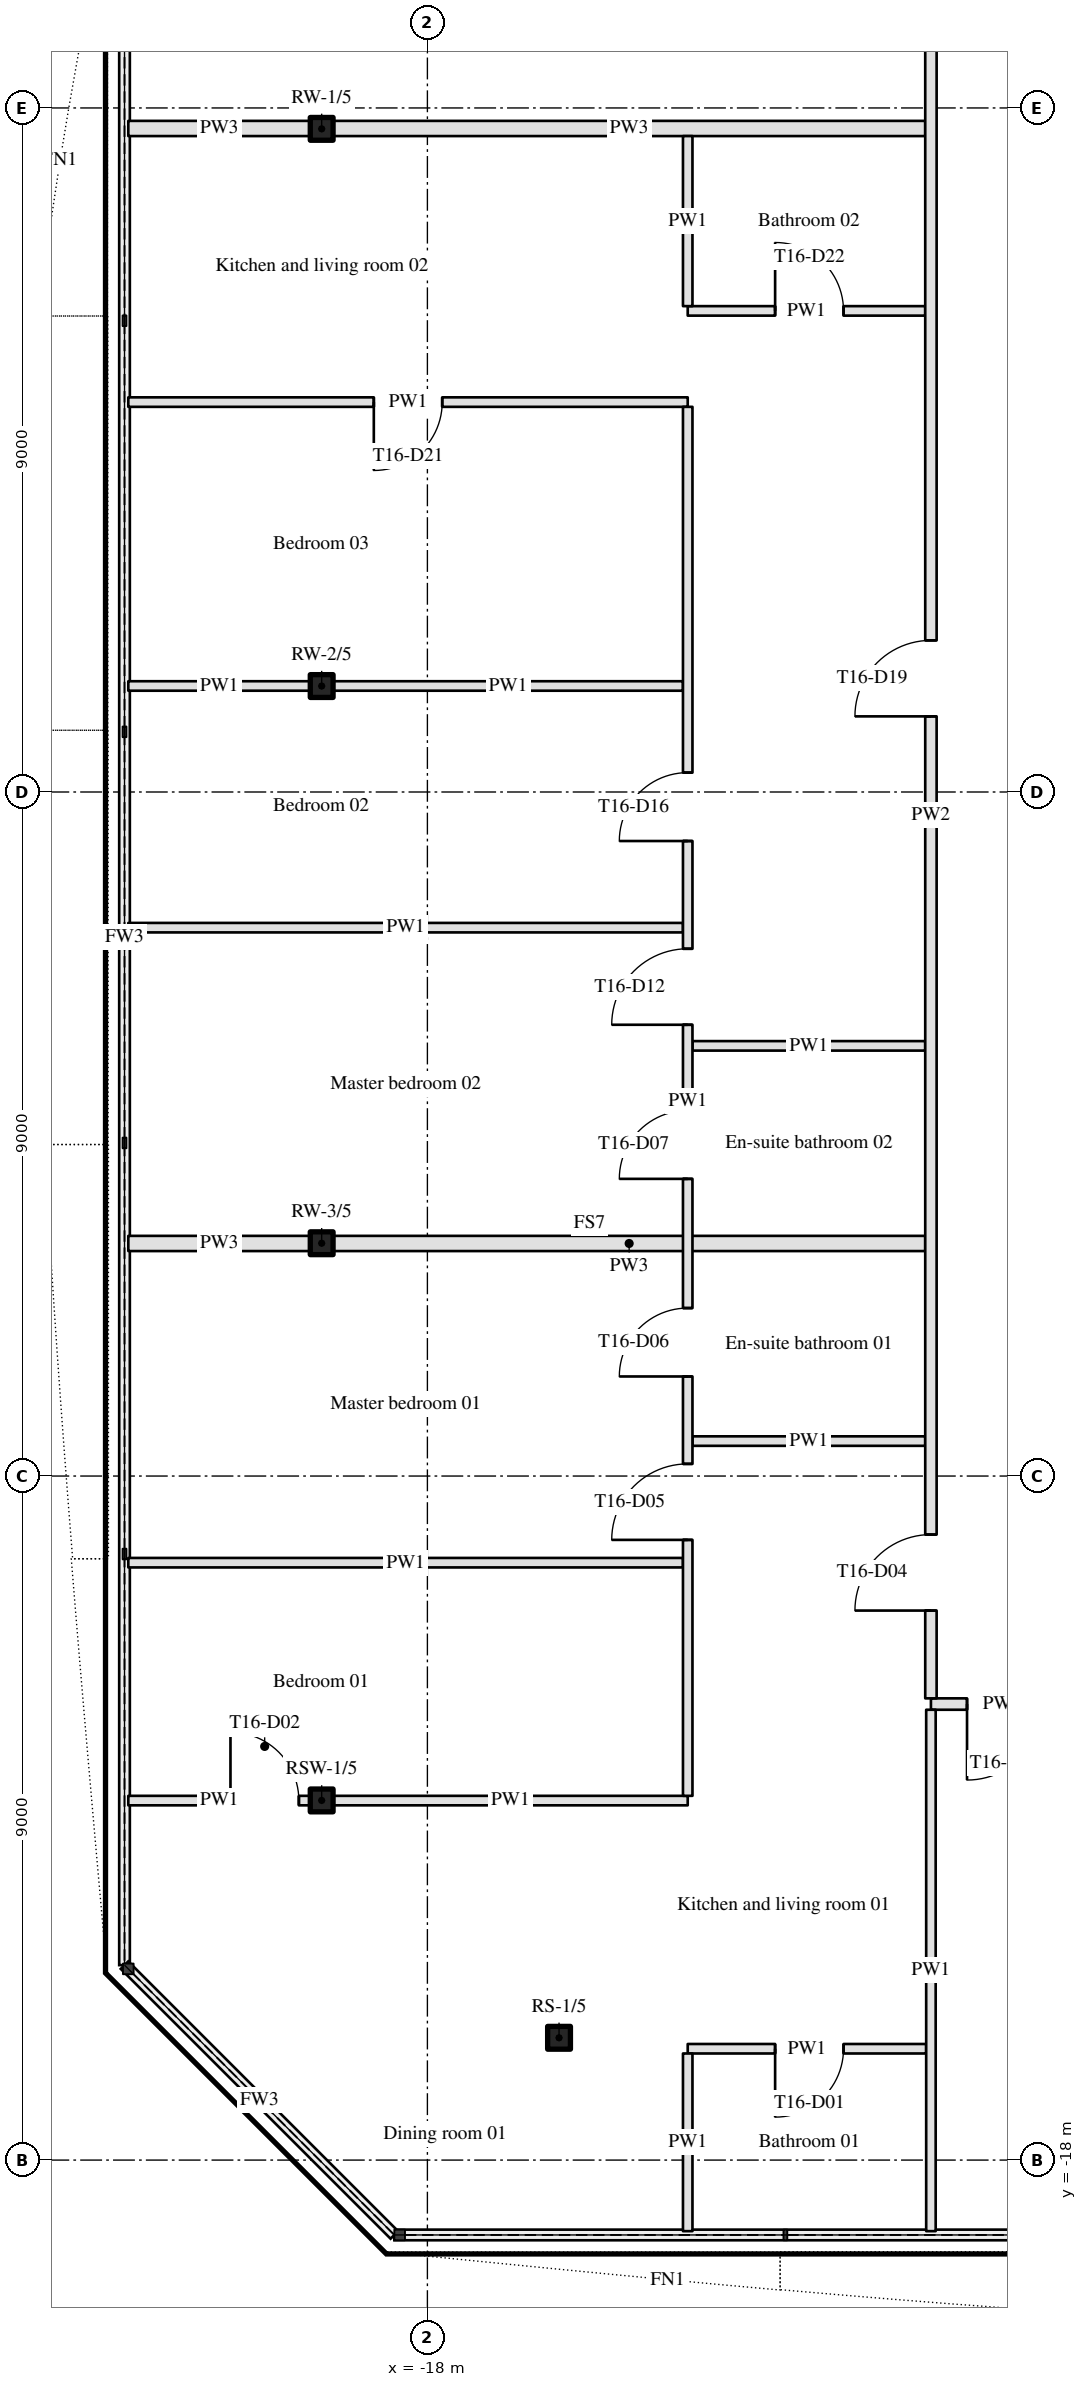
"""IFC4 building model, lengths in metres.
Left out: names, types, materials, properties, quantities, classifications, styles, units other than length and angle.
Written with IfcOpenShell. Run it as: python <this file> out.ifc"""

import sys

from ifc_helpers import new_model, si_unit, direction, frame, frame_2d, origin, origin_2d, place, context, subcontext, project, spatial, rectangle, hollow_rectangle, extrude, element, fill, save


model = new_model("IFC4")
c1 = context("Model", 3, precision=1e-05, world=origin(), true_north=direction((0.0, 1.0)))
c2 = subcontext(c1, "Body", "Model", "MODEL_VIEW")
j1 = project(units=[si_unit("LENGTHUNIT", "METRE"), si_unit("PLANEANGLEUNIT", "RADIAN")], contexts=[c1])
p1 = place(None, origin())
s1 = spatial("IfcSite", under=j1, at=p1, CompositionType="ELEMENT")
p2 = place(p1, origin())
s2 = spatial("IfcBuilding", under=s1, at=p2, CompositionType="ELEMENT")
p3 = place(p2, frame((0.0, 0.0, 217.2)))
s3 = spatial("IfcBuildingStorey", under=s2, at=p3, CompositionType="ELEMENT", Elevation=217.2)
for number, where, z_axis, x_axis in (
    (1, (-16.268, -16.391, 0.0), (0.0, 0.0, 1.0), (1.0, 0.0, 0.0)),
    (2, (-19.391, 8.725, 0.0), (0.0, 0.0, 1.0), (1.0, 0.0, 0.0)),
    (3, (-19.391, 1.394, 0.0), (0.0, 0.0, 1.0), (1.0, 0.0, 0.0)),
    (4, (-19.391, -5.937, 0.0), (0.0, 0.0, 1.0), (1.0, 0.0, 0.0)),
    (5, (-19.391, -13.268, 0.0), (0.0, 0.0, 1.0), (1.0, 0.0, 0.0)),
):
    element("IfcColumn", number, at=place(p3, frame(where, z_axis=z_axis, x_axis=x_axis)), inside=s3, PredefinedType="COLUMN", context=c2, shape_type="SweptSolid", body=[
        extrude(hollow_rectangle(XDim=0.3, YDim=0.3, WallThickness=0.02, InnerFilletRadius=0.03, OuterFilletRadius=0.05, at=origin_2d()), origin(), (0.0, 0.0, 1.0), 3.15),
    ])
p4 = place(p3, frame((-11.438, -16.535, 0.0), z_axis=(0.0, 0.0, 1.0), x_axis=(-1.0, 0.0, 0.0)))
e6 = element("IfcWall", 6, at=p4, inside=s3, PredefinedType="PARTITIONING", context=c2, shape_type="SweptSolid", body=[
    extrude(rectangle(XDim=3.137, YDim=0.125, at=frame_2d((1.569, 0.0))), origin(), (0.0, 0.0, 1.0), 2.21),
])
p5 = place(p4, frame((1.087, 0.0, 0.0)))
e7 = element("IfcOpeningElement", 7, at=p5, cuts=e6, PredefinedType="OPENING", context=c2, shape_type="SweptSolid", body=[
    extrude(rectangle(XDim=0.9, YDim=2.1, at=frame_2d((0.45, 1.05))), frame((0.0, 0.073, 0.0), z_axis=(0.0, -1.0, 0.0), x_axis=(1.0, 0.0, 0.0)), (0.0, 0.0, 1.0), 0.145),
])
p6 = place(p3, frame((-21.935, -13.27, 0.0), z_axis=(0.0, 0.0, 1.0), x_axis=(1.0, 0.0, 0.0)))
e8 = element("IfcWall", 8, at=p6, inside=s3, PredefinedType="PARTITIONING", context=c2, shape_type="SweptSolid", body=[
    extrude(rectangle(XDim=2.394, YDim=0.125, at=frame_2d((1.197, 0.0))), origin(), (0.0, 0.0, 1.0), 2.21),
])
p7 = place(p6, frame((1.344, 0.0, 0.0)))
e9 = element("IfcOpeningElement", 9, at=p7, cuts=e8, PredefinedType="OPENING", context=c2, shape_type="SweptSolid", body=[
    extrude(rectangle(XDim=0.9, YDim=2.1, at=frame_2d((0.45, 1.05))), frame((0.0, 0.073, 0.0), z_axis=(0.0, -1.0, 0.0), x_axis=(1.0, 0.0, 0.0)), (0.0, 0.0, 1.0), 0.145),
])
p8 = place(p3, frame((-19.241, -13.27, 0.0), z_axis=(0.0, 0.0, 1.0), x_axis=(1.0, 0.0, 0.0)))
e10 = element("IfcWall", 10, at=p8, inside=s3, PredefinedType="PARTITIONING", context=c2, shape_type="SweptSolid", body=[
    extrude(rectangle(XDim=4.666, YDim=0.125, at=frame_2d((2.333, 0.0))), origin(), (0.0, 0.0, 1.0), 2.21),
])
p9 = place(p3, frame((-9.5, -12.0, 0.0), z_axis=(0.0, 0.0, 1.0), x_axis=(-1.0, 0.0, 0.0)))
e11 = element("IfcWall", 11, at=p9, inside=s3, PredefinedType="PARTITIONING", context=c2, shape_type="SweptSolid", body=[
    extrude(rectangle(XDim=1.875, YDim=0.15, at=frame_2d((0.938, 0.0))), origin(), (0.0, 0.0, 1.0), 2.21),
])
p10 = place(p9, frame((0.4, 0.0, 0.0)))
e12 = element("IfcOpeningElement", 12, at=p10, cuts=e11, PredefinedType="OPENING", context=c2, shape_type="SweptSolid", body=[
    extrude(rectangle(XDim=1.0, YDim=2.1, at=frame_2d((0.5, 1.05))), frame((0.0, 0.085, 0.0), z_axis=(0.0, -1.0, 0.0), x_axis=(1.0, 0.0, 0.0)), (0.0, 0.0, 1.0), 0.17),
])
p11 = place(p3, frame((-21.935, -10.14, 0.0), z_axis=(0.0, 0.0, 1.0), x_axis=(1.0, 0.0, 0.0)))
e13 = element("IfcWall", 13, at=p11, inside=s3, PredefinedType="PARTITIONING", context=c2, shape_type="SweptSolid", body=[
    extrude(rectangle(XDim=7.298, YDim=0.125, at=frame_2d((3.649, 0.0))), origin(), (0.0, 0.0, 1.0), 2.21),
])
p12 = place(p3, frame((-14.512, -8.54, 0.0), z_axis=(0.0, 0.0, 1.0), x_axis=(1.0, 0.0, 0.0)))
e14 = element("IfcWall", 14, at=p12, inside=s3, PredefinedType="PARTITIONING", context=c2, shape_type="SweptSolid", body=[
    extrude(rectangle(XDim=3.062, YDim=0.125, at=frame_2d((1.531, 0.0))), origin(), (0.0, 0.0, 1.0), 2.21),
])
p13 = place(p3, frame((-21.935, -5.94, 0.0), z_axis=(0.0, 0.0, 1.0), x_axis=(1.0, 0.0, 0.0)))
e15 = element("IfcWall", 15, at=p13, inside=s3, PredefinedType="PARTITIONING", context=c2, shape_type="SweptSolid", body=[
    extrude(rectangle(XDim=2.394, YDim=0.2, at=frame_2d((1.197, 0.0))), origin(), (0.0, 0.0, 1.0), 2.21),
])
p14 = place(p3, frame((-19.241, -5.94, 0.0), z_axis=(0.0, 0.0, 1.0), x_axis=(1.0, 0.0, 0.0)))
e16 = element("IfcWall", 16, at=p14, inside=s3, PredefinedType="PARTITIONING", context=c2, shape_type="SweptSolid", body=[
    extrude(rectangle(XDim=7.791, YDim=0.2, at=frame_2d((3.896, 0.0))), origin(), (0.0, 0.0, 1.0), 2.21),
])
p15 = place(p3, frame((-14.512, -3.34, 0.0), z_axis=(0.0, 0.0, 1.0), x_axis=(1.0, 0.0, 0.0)))
e17 = element("IfcWall", 17, at=p15, inside=s3, PredefinedType="PARTITIONING", context=c2, shape_type="SweptSolid", body=[
    extrude(rectangle(XDim=3.062, YDim=0.125, at=frame_2d((1.531, 0.0))), origin(), (0.0, 0.0, 1.0), 2.21),
])
p16 = place(p3, frame((-21.935, -1.785, 0.0), z_axis=(0.0, 0.0, 1.0), x_axis=(1.0, 0.0, 0.0)))
e18 = element("IfcWall", 18, at=p16, inside=s3, PredefinedType="PARTITIONING", context=c2, shape_type="SweptSolid", body=[
    extrude(rectangle(XDim=7.298, YDim=0.125, at=frame_2d((3.649, 0.0))), origin(), (0.0, 0.0, 1.0), 2.21),
])
p17 = place(p3, frame((-21.935, 1.395, 0.0), z_axis=(0.0, 0.0, 1.0), x_axis=(1.0, 0.0, 0.0)))
e19 = element("IfcWall", 19, at=p17, inside=s3, PredefinedType="PARTITIONING", context=c2, shape_type="SweptSolid", body=[
    extrude(rectangle(XDim=2.394, YDim=0.125, at=frame_2d((1.197, 0.0))), origin(), (0.0, 0.0, 1.0), 2.21),
])
p18 = place(p3, frame((-19.241, 1.395, 0.0), z_axis=(0.0, 0.0, 1.0), x_axis=(1.0, 0.0, 0.0)))
e20 = element("IfcWall", 20, at=p18, inside=s3, PredefinedType="PARTITIONING", context=c2, shape_type="SweptSolid", body=[
    extrude(rectangle(XDim=4.604, YDim=0.125, at=frame_2d((2.302, 0.0))), origin(), (0.0, 0.0, 1.0), 2.21),
])
p19 = place(p3, frame((-14.575, 5.13, 0.0), z_axis=(0.0, 0.0, 1.0), x_axis=(-1.0, 0.0, 0.0)))
e21 = element("IfcWall", 21, at=p19, inside=s3, PredefinedType="PARTITIONING", context=c2, shape_type="SweptSolid", body=[
    extrude(rectangle(XDim=7.36, YDim=0.125, at=frame_2d((3.68, 0.0))), origin(), (0.0, 0.0, 1.0), 2.21),
])
p20 = place(p19, frame((3.23, 0.0, 0.0)))
e22 = element("IfcOpeningElement", 22, at=p20, cuts=e21, PredefinedType="OPENING", context=c2, shape_type="SweptSolid", body=[
    extrude(rectangle(XDim=0.9, YDim=2.1, at=frame_2d((0.45, 1.05))), frame((0.0, 0.073, 0.0), z_axis=(0.0, -1.0, 0.0), x_axis=(1.0, 0.0, 0.0)), (0.0, 0.0, 1.0), 0.145),
])
p21 = place(p3, frame((-14.575, 6.33, 0.0), z_axis=(0.0, 0.0, 1.0), x_axis=(1.0, 0.0, 0.0)))
e23 = element("IfcWall", 23, at=p21, inside=s3, PredefinedType="PARTITIONING", context=c2, shape_type="SweptSolid", body=[
    extrude(rectangle(XDim=3.125, YDim=0.125, at=frame_2d((1.562, 0.0))), origin(), (0.0, 0.0, 1.0), 2.21),
])
p22 = place(p21, frame((1.15, 0.0, 0.0)))
e24 = element("IfcOpeningElement", 24, at=p22, cuts=e23, PredefinedType="OPENING", context=c2, shape_type="SweptSolid", body=[
    extrude(rectangle(XDim=0.9, YDim=2.1, at=frame_2d((0.45, 1.05))), frame((0.0, 0.073, 0.0), z_axis=(0.0, -1.0, 0.0), x_axis=(1.0, 0.0, 0.0)), (0.0, 0.0, 1.0), 0.145),
])
p23 = place(p3, frame((-21.935, 8.73, 0.0), z_axis=(0.0, 0.0, 1.0), x_axis=(1.0, 0.0, 0.0)))
e25 = element("IfcWall", 25, at=p23, inside=s3, PredefinedType="PARTITIONING", context=c2, shape_type="SweptSolid", body=[
    extrude(rectangle(XDim=2.394, YDim=0.2, at=frame_2d((1.197, 0.0))), origin(), (0.0, 0.0, 1.0), 2.21),
])
p24 = place(p3, frame((-19.241, 8.73, 0.0), z_axis=(0.0, 0.0, 1.0), x_axis=(1.0, 0.0, 0.0)))
e26 = element("IfcWall", 26, at=p24, inside=s3, PredefinedType="PARTITIONING", context=c2, shape_type="SweptSolid", body=[
    extrude(rectangle(XDim=7.791, YDim=0.2, at=frame_2d((3.896, 0.0))), origin(), (0.0, 0.0, 1.0), 2.21),
])
p25 = place(p3, frame((-14.575, -18.935, 0.0), z_axis=(0.0, 0.0, 1.0), x_axis=(0.0, 1.0, 0.0)))
e27 = element("IfcWall", 27, at=p25, inside=s3, PredefinedType="PARTITIONING", context=c2, shape_type="SweptSolid", body=[
    extrude(rectangle(XDim=2.338, YDim=0.125, at=frame_2d((1.169, 0.0))), origin(), (0.0, 0.0, 1.0), 2.21),
])
p26 = place(p3, frame((-14.575, -13.208, 0.0), z_axis=(0.0, 0.0, 1.0), x_axis=(0.0, 1.0, 0.0)))
e28 = element("IfcWall", 28, at=p26, inside=s3, PredefinedType="PARTITIONING", context=c2, shape_type="SweptSolid", body=[
    extrude(rectangle(XDim=18.275, YDim=0.125, at=frame_2d((9.137, 0.0))), origin(), (0.0, 0.0, 1.0), 2.21),
])
p27 = place(p26, frame((3.367, 0.0, 0.0)))
e29 = element("IfcOpeningElement", 29, at=p27, cuts=e28, PredefinedType="OPENING", context=c2, shape_type="SweptSolid", body=[
    extrude(rectangle(XDim=1.0, YDim=2.1, at=frame_2d((0.5, 1.05))), frame((0.0, 0.073, 0.0), z_axis=(0.0, -1.0, 0.0), x_axis=(1.0, 0.0, 0.0)), (0.0, 0.0, 1.0), 0.145),
])
p28 = place(p26, frame((5.518, 0.0, 0.0)))
e30 = element("IfcOpeningElement", 30, at=p28, cuts=e28, PredefinedType="OPENING", context=c2, shape_type="SweptSolid", body=[
    extrude(rectangle(XDim=0.9, YDim=2.1, at=frame_2d((0.45, 1.05))), frame((0.0, 0.073, 0.0), z_axis=(0.0, -1.0, 0.0), x_axis=(1.0, 0.0, 0.0)), (0.0, 0.0, 1.0), 0.145),
])
p29 = place(p26, frame((12.562, 0.0, 0.0)))
e31 = element("IfcOpeningElement", 31, at=p29, cuts=e28, PredefinedType="OPENING", context=c2, shape_type="SweptSolid", body=[
    extrude(rectangle(XDim=0.9, YDim=2.1, at=frame_2d((0.45, 1.05))), frame((0.0, 0.073, 0.0), z_axis=(0.0, -1.0, 0.0), x_axis=(1.0, 0.0, 0.0)), (0.0, 0.0, 1.0), 0.145),
])
p30 = place(p26, frame((10.145, 0.0, 0.0)))
e32 = element("IfcOpeningElement", 32, at=p30, cuts=e28, PredefinedType="OPENING", context=c2, shape_type="SweptSolid", body=[
    extrude(rectangle(XDim=1.0, YDim=2.1, at=frame_2d((0.5, 1.05))), frame((0.0, 0.073, 0.0), z_axis=(0.0, -1.0, 0.0), x_axis=(1.0, 0.0, 0.0)), (0.0, 0.0, 1.0), 0.145),
])
p31 = place(p26, frame((8.117, 0.0, 0.0)))
e33 = element("IfcOpeningElement", 33, at=p31, cuts=e28, PredefinedType="OPENING", context=c2, shape_type="SweptSolid", body=[
    extrude(rectangle(XDim=0.9, YDim=2.1, at=frame_2d((0.45, 1.05))), frame((0.0, 0.073, 0.0), z_axis=(0.0, -1.0, 0.0), x_axis=(1.0, 0.0, 0.0)), (0.0, 0.0, 1.0), 0.145),
])
p32 = place(p3, frame((-14.575, 6.393, 0.0), z_axis=(0.0, 0.0, 1.0), x_axis=(0.0, 1.0, 0.0)))
e34 = element("IfcWall", 34, at=p32, inside=s3, PredefinedType="PARTITIONING", context=c2, shape_type="SweptSolid", body=[
    extrude(rectangle(XDim=2.237, YDim=0.125, at=frame_2d((1.119, 0.0))), origin(), (0.0, 0.0, 1.0), 2.21),
])
p33 = place(p3, frame((-11.375, -18.935, 0.0), z_axis=(0.0, 0.0, 1.0), x_axis=(0.0, 1.0, 0.0)))
e35 = element("IfcWall", 35, at=p33, inside=s3, PredefinedType="PARTITIONING", context=c2, shape_type="SweptSolid", body=[
    extrude(rectangle(XDim=6.86, YDim=0.125, at=frame_2d((3.43, 0.0))), origin(), (0.0, 0.0, 1.0), 2.21),
])
p34 = place(p3, frame((-11.375, -11.925, 0.0), z_axis=(0.0, 0.0, 1.0), x_axis=(0.0, 1.0, 0.0)))
e36 = element("IfcWall", 36, at=p34, inside=s3, PredefinedType="PARTITIONING", context=c2, shape_type="SweptSolid", body=[
    extrude(rectangle(XDim=23.25, YDim=0.15, at=frame_2d((11.625, 0.0))), origin(), (0.0, 0.0, 1.0), 2.21),
])
p35 = place(p34, frame((1.155, 0.0, 0.0)))
e37 = element("IfcOpeningElement", 37, at=p35, cuts=e36, PredefinedType="OPENING", context=c2, shape_type="SweptSolid", body=[
    extrude(rectangle(XDim=1.0, YDim=2.1, at=frame_2d((0.5, 1.05))), frame((0.0, 0.085, 0.0), z_axis=(0.0, -1.0, 0.0), x_axis=(1.0, 0.0, 0.0)), (0.0, 0.0, 1.0), 0.17),
])
p36 = place(p34, frame((12.92, 0.0, 0.0)))
e38 = element("IfcOpeningElement", 38, at=p36, cuts=e36, PredefinedType="OPENING", context=c2, shape_type="SweptSolid", body=[
    extrude(rectangle(XDim=1.0, YDim=2.1, at=frame_2d((0.5, 1.05))), frame((0.0, 0.085, 0.0), z_axis=(0.0, -1.0, 0.0), x_axis=(1.0, 0.0, 0.0)), (0.0, 0.0, 1.0), 0.17),
])
p37 = place(p34, frame((21.875, 0.0, 0.0)))
e39 = element("IfcOpeningElement", 39, at=p37, cuts=e36, PredefinedType="OPENING", context=c2, shape_type="SweptSolid", body=[
    extrude(rectangle(XDim=1.0, YDim=2.1, at=frame_2d((0.5, 1.05))), frame((0.0, 0.085, 0.0), z_axis=(0.0, -1.0, 0.0), x_axis=(1.0, 0.0, 0.0)), (0.0, 0.0, 1.0), 0.17),
])
p38 = place(p35, origin())
e40 = element("IfcDoor", 40, at=p38, inside=s3, OperationType="SINGLE_SWING_LEFT", PredefinedType="DOOR", context=c2, shape_type="SweptSolid", body=[
    extrude(rectangle(XDim=1.0, YDim=2.1, at=frame_2d((0.5, 1.05))), frame((0.0, 0.025, 0.0), z_axis=(0.0, -1.0, 0.0), x_axis=(1.0, 0.0, 0.0)), (0.0, 0.0, 1.0), 0.05),
])
fill(e37, e40)
p39 = place(p36, origin())
e41 = element("IfcDoor", 41, at=p39, inside=s3, OperationType="SINGLE_SWING_LEFT", PredefinedType="DOOR", context=c2, shape_type="SweptSolid", body=[
    extrude(rectangle(XDim=1.0, YDim=2.1, at=frame_2d((0.5, 1.05))), frame((0.0, 0.025, 0.0), z_axis=(0.0, -1.0, 0.0), x_axis=(1.0, 0.0, 0.0)), (0.0, 0.0, 1.0), 0.05),
])
fill(e38, e41)
p40 = place(p5, origin())
e42 = element("IfcDoor", 42, at=p40, inside=s3, OperationType="SINGLE_SWING_RIGHT", PredefinedType="DOOR", context=c2, shape_type="SweptSolid", body=[
    extrude(rectangle(XDim=0.9, YDim=2.1, at=frame_2d((0.45, 1.05))), frame((0.0, 0.025, 0.0), z_axis=(0.0, -1.0, 0.0), x_axis=(1.0, 0.0, 0.0)), (0.0, 0.0, 1.0), 0.05),
])
fill(e7, e42)
p41 = place(p7, origin())
e43 = element("IfcDoor", 43, at=p41, inside=s3, OperationType="SINGLE_SWING_LEFT", PredefinedType="DOOR", context=c2, shape_type="SweptSolid", body=[
    extrude(rectangle(XDim=0.9, YDim=2.1, at=frame_2d((0.45, 1.05))), frame((0.0, 0.025, 0.0), z_axis=(0.0, -1.0, 0.0), x_axis=(1.0, 0.0, 0.0)), (0.0, 0.0, 1.0), 0.05),
])
fill(e9, e43)
p42 = place(p27, origin())
e44 = element("IfcDoor", 44, at=p42, inside=s3, OperationType="SINGLE_SWING_LEFT", PredefinedType="DOOR", context=c2, shape_type="SweptSolid", body=[
    extrude(rectangle(XDim=1.0, YDim=2.1, at=frame_2d((0.5, 1.05))), frame((0.0, 0.025, 0.0), z_axis=(0.0, -1.0, 0.0), x_axis=(1.0, 0.0, 0.0)), (0.0, 0.0, 1.0), 0.05),
])
fill(e29, e44)
p43 = place(p28, origin())
e45 = element("IfcDoor", 45, at=p43, inside=s3, OperationType="SINGLE_SWING_LEFT", PredefinedType="DOOR", context=c2, shape_type="SweptSolid", body=[
    extrude(rectangle(XDim=0.9, YDim=2.1, at=frame_2d((0.45, 1.05))), frame((0.0, 0.025, 0.0), z_axis=(0.0, -1.0, 0.0), x_axis=(1.0, 0.0, 0.0)), (0.0, 0.0, 1.0), 0.05),
])
fill(e30, e45)
p44 = place(p22, origin())
e46 = element("IfcDoor", 46, at=p44, inside=s3, OperationType="SINGLE_SWING_LEFT", PredefinedType="DOOR", context=c2, shape_type="SweptSolid", body=[
    extrude(rectangle(XDim=0.9, YDim=2.1, at=frame_2d((0.45, 1.05))), frame((0.0, 0.025, 0.0), z_axis=(0.0, -1.0, 0.0), x_axis=(1.0, 0.0, 0.0)), (0.0, 0.0, 1.0), 0.05),
])
fill(e24, e46)
p45 = place(p29, origin())
e47 = element("IfcDoor", 47, at=p45, inside=s3, OperationType="SINGLE_SWING_LEFT", PredefinedType="DOOR", context=c2, shape_type="SweptSolid", body=[
    extrude(rectangle(XDim=0.9, YDim=2.1, at=frame_2d((0.45, 1.05))), frame((0.0, 0.025, 0.0), z_axis=(0.0, -1.0, 0.0), x_axis=(1.0, 0.0, 0.0)), (0.0, 0.0, 1.0), 0.05),
])
fill(e31, e47)
p46 = place(p20, origin())
e48 = element("IfcDoor", 48, at=p46, inside=s3, OperationType="SINGLE_SWING_RIGHT", PredefinedType="DOOR", context=c2, shape_type="SweptSolid", body=[
    extrude(rectangle(XDim=0.9, YDim=2.1, at=frame_2d((0.45, 1.05))), frame((0.0, 0.025, 0.0), z_axis=(0.0, -1.0, 0.0), x_axis=(1.0, 0.0, 0.0)), (0.0, 0.0, 1.0), 0.05),
])
fill(e22, e48)
p47 = place(p30, origin())
e49 = element("IfcDoor", 49, at=p47, inside=s3, OperationType="SINGLE_SWING_LEFT", PredefinedType="DOOR", context=c2, shape_type="SweptSolid", body=[
    extrude(rectangle(XDim=1.0, YDim=2.1, at=frame_2d((0.5, 1.05))), frame((0.0, 0.025, 0.0), z_axis=(0.0, -1.0, 0.0), x_axis=(1.0, 0.0, 0.0)), (0.0, 0.0, 1.0), 0.05),
])
fill(e32, e49)
p48 = place(p31, origin())
e50 = element("IfcDoor", 50, at=p48, inside=s3, OperationType="SINGLE_SWING_LEFT", PredefinedType="DOOR", context=c2, shape_type="SweptSolid", body=[
    extrude(rectangle(XDim=0.9, YDim=2.1, at=frame_2d((0.45, 1.05))), frame((0.0, 0.025, 0.0), z_axis=(0.0, -1.0, 0.0), x_axis=(1.0, 0.0, 0.0)), (0.0, 0.0, 1.0), 0.05),
])
fill(e33, e50)
p49 = place(p10, origin())
e51 = element("IfcDoor", 51, at=p49, inside=s3, OperationType="SINGLE_SWING_RIGHT", PredefinedType="DOOR", context=c2, shape_type="SweptSolid", body=[
    extrude(rectangle(XDim=1.0, YDim=2.1, at=frame_2d((0.5, 1.05))), frame((0.0, 0.025, 0.0), z_axis=(0.0, -1.0, 0.0), x_axis=(1.0, 0.0, 0.0)), (0.0, 0.0, 1.0), 0.05),
])
fill(e12, e51)
save(model, sys.argv[1])
